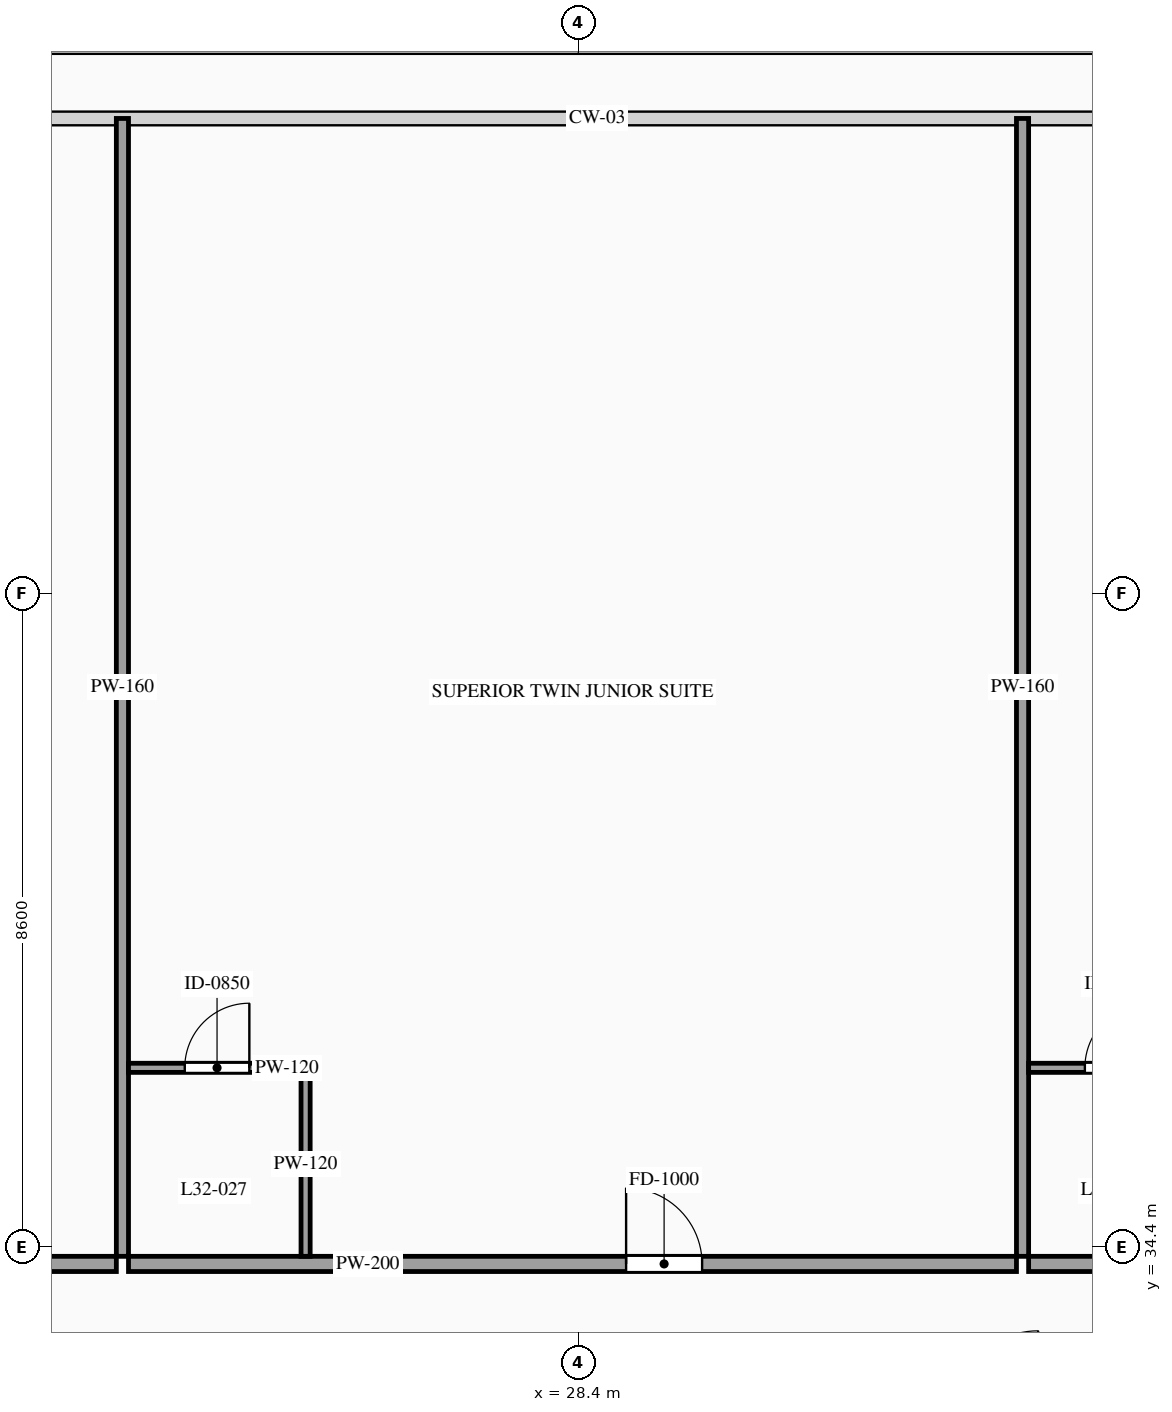
"""IFC4 building model, lengths in metres.
Left out: names, types, materials, properties, quantities, classifications, styles, units other than length and angle.
Written with IfcOpenShell. Run it as: python <this file> out.ifc"""

import sys

from ifc_helpers import new_model, si_unit, direction, frame, frame_2d, origin, place, context, subcontext, project, spatial, rectangle, extrude, source, transform, mapped, element, fill, save


model = new_model("IFC4")
c1 = context("Model", 3, precision=1e-05, world=origin(), true_north=direction((0.0, 1.0)))
c2 = subcontext(c1, "Body", "Model", "MODEL_VIEW")
j1 = project(units=[si_unit("LENGTHUNIT", "METRE"), si_unit("PLANEANGLEUNIT", "RADIAN")], contexts=[c1])
p1 = place(None, origin())
s1 = spatial("IfcSite", under=j1, at=p1, CompositionType="ELEMENT")
p2 = place(p1, origin())
s2 = spatial("IfcBuilding", under=s1, at=p2, CompositionType="ELEMENT")
p3 = place(p2, frame((0.0, 0.0, 122.6)))
s3 = spatial("IfcBuildingStorey", under=s2, at=p3, CompositionType="ELEMENT", Elevation=122.6)
p4 = place(p3, frame((16.44, 34.18, 0.0), z_axis=(0.0, 0.0, 1.0), x_axis=(1.0, 0.0, 0.0)))
e1 = element("IfcWall", 1, at=p4, inside=s3, PredefinedType="PARTITIONING", context=c2, shape_type="SweptSolid", body=[
    extrude(rectangle(XDim=5.882, YDim=0.2, at=frame_2d((2.941, 0.0))), origin(), (0.0, 0.0, 1.0), 3.38),
])
p5 = place(p4, frame((3.646, 0.0, 0.0)))
e2 = element("IfcOpeningElement", 2, at=p5, cuts=e1, PredefinedType="OPENING", context=c2, shape_type="SweptSolid", body=[
    extrude(rectangle(XDim=1.0, YDim=2.2, at=frame_2d((0.5, 1.1))), frame((0.0, 0.115, 0.0), z_axis=(0.0, -1.0, 0.0), x_axis=(1.0, 0.0, 0.0)), (0.0, 0.0, 1.0), 0.23),
])
m1 = source(origin(), c2, "Body", "SweptSolid", [
    extrude(rectangle(XDim=14.97, YDim=0.16, at=frame_2d((7.485, 0.0))), origin(), (0.0, 0.0, 1.0), 3.38),
])
p6 = place(p3, frame((22.402, 34.28, 0.0), z_axis=(0.0, 0.0, 1.0), x_axis=(0.0, 1.0, 0.0)))
e3 = element("IfcWall", 3, at=p6, inside=s3, PredefinedType="PARTITIONING", context=c2, shape_type="MappedRepresentation", body=[
    mapped(m1, transform((0.0, 0.0, 0.0), scale=1.0)),
])
p7 = place(p3, frame((22.482, 34.18, 0.0), z_axis=(0.0, 0.0, 1.0), x_axis=(1.0, 0.0, 0.0)))
e4 = element("IfcWall", 4, at=p7, inside=s3, PredefinedType="PARTITIONING", context=c2, shape_type="SweptSolid", body=[
    extrude(rectangle(XDim=11.683, YDim=0.2, at=frame_2d((5.842, 0.0))), origin(), (0.0, 0.0, 1.0), 3.38),
])
p8 = place(p7, frame((6.547, 0.0, 0.0)))
e5 = element("IfcOpeningElement", 5, at=p8, cuts=e4, PredefinedType="OPENING", context=c2, shape_type="SweptSolid", body=[
    extrude(rectangle(XDim=1.0, YDim=2.2, at=frame_2d((0.5, 1.1))), frame((0.0, 0.115, 0.0), z_axis=(0.0, -1.0, 0.0), x_axis=(1.0, 0.0, 0.0)), (0.0, 0.0, 1.0), 0.23),
])
p9 = place(p3, frame((34.245, 34.28, 0.0), z_axis=(0.0, 0.0, 1.0), x_axis=(0.0, 1.0, 0.0)))
e6 = element("IfcWall", 6, at=p9, inside=s3, PredefinedType="PARTITIONING", context=c2, shape_type="MappedRepresentation", body=[
    mapped(m1, transform((0.0, 0.0, 0.0), scale=1.0)),
])
p10 = place(p3, frame((22.482, 36.76, 0.0), z_axis=(0.0, 0.0, 1.0), x_axis=(1.0, 0.0, 0.0)))
e7 = element("IfcWall", 7, at=p10, inside=s3, PredefinedType="PARTITIONING", context=c2, shape_type="SweptSolid", body=[
    extrude(rectangle(XDim=2.33, YDim=0.12, at=frame_2d((1.165, 0.0))), origin(), (0.0, 0.0, 1.0), 3.38),
])
p11 = place(p10, frame((0.74, 0.0, 0.0)))
e8 = element("IfcOpeningElement", 8, at=p11, cuts=e7, PredefinedType="OPENING", context=c2, shape_type="SweptSolid", body=[
    extrude(rectangle(XDim=0.85, YDim=2.1, at=frame_2d((0.425, 1.05))), frame((0.0, 0.075, 0.0), z_axis=(0.0, -1.0, 0.0), x_axis=(1.0, 0.0, 0.0)), (0.0, 0.0, 1.0), 0.15),
])
m2 = source(origin(), c2, "Body", "SweptSolid", [
    extrude(rectangle(XDim=2.42, YDim=0.12, at=frame_2d((1.21, 0.0))), origin(), (0.0, 0.0, 1.0), 3.38),
])
p12 = place(p3, frame((24.812, 34.28, 0.0), z_axis=(0.0, 0.0, 1.0), x_axis=(0.0, 1.0, 0.0)))
e9 = element("IfcWall", 9, at=p12, inside=s3, PredefinedType="PARTITIONING", context=c2, shape_type="MappedRepresentation", body=[
    mapped(m2, transform((0.0, 0.0, 0.0), scale=1.0)),
])
p13 = place(p3, frame((34.325, 34.18, 0.0), z_axis=(0.0, 0.0, 1.0), x_axis=(1.0, 0.0, 0.0)))
e10 = element("IfcWall", 10, at=p13, inside=s3, PredefinedType="PARTITIONING", context=c2, shape_type="SweptSolid", body=[
    extrude(rectangle(XDim=4.445, YDim=0.2, at=frame_2d((2.223, 0.0))), origin(), (0.0, 0.0, 1.0), 3.38),
])
p14 = place(p13, frame((2.927, 0.0, 0.0)))
e11 = element("IfcOpeningElement", 11, at=p14, cuts=e10, PredefinedType="OPENING", context=c2, shape_type="SweptSolid", body=[
    extrude(rectangle(XDim=1.0, YDim=2.2, at=frame_2d((0.5, 1.1))), frame((0.0, 0.115, 0.0), z_axis=(0.0, -1.0, 0.0), x_axis=(1.0, 0.0, 0.0)), (0.0, 0.0, 1.0), 0.23),
])
p15 = place(p3, frame((34.325, 36.76, 0.0), z_axis=(0.0, 0.0, 1.0), x_axis=(1.0, 0.0, 0.0)))
e12 = element("IfcWall", 12, at=p15, inside=s3, PredefinedType="PARTITIONING", context=c2, shape_type="SweptSolid", body=[
    extrude(rectangle(XDim=2.33, YDim=0.12, at=frame_2d((1.165, 0.0))), origin(), (0.0, 0.0, 1.0), 3.38),
])
p16 = place(p15, frame((0.74, 0.0, 0.0)))
e13 = element("IfcOpeningElement", 13, at=p16, cuts=e12, PredefinedType="OPENING", context=c2, shape_type="SweptSolid", body=[
    extrude(rectangle(XDim=0.85, YDim=2.1, at=frame_2d((0.425, 1.05))), frame((0.0, 0.075, 0.0), z_axis=(0.0, -1.0, 0.0), x_axis=(1.0, 0.0, 0.0)), (0.0, 0.0, 1.0), 0.15),
])
m3 = source(origin(), c2, "Body", "SweptSolid", [
    extrude(rectangle(XDim=1.0, YDim=2.2, at=frame_2d((0.5, 1.1))), frame((0.0, 0.025, 0.0), z_axis=(0.0, -1.0, 0.0), x_axis=(1.0, 0.0, 0.0)), (0.0, 0.0, 1.0), 0.05),
])
p17 = place(p8, origin())
e14 = element("IfcDoor", 14, at=p17, inside=s3, OperationType="SINGLE_SWING_LEFT", PredefinedType="DOOR", context=c2, shape_type="MappedRepresentation", body=[
    mapped(m3, transform((0.0, 0.0, 0.0), scale=1.0)),
])
fill(e5, e14)
m4 = source(origin(), c2, "Body", "SweptSolid", [
    extrude(rectangle(XDim=0.85, YDim=2.1, at=frame_2d((0.425, 1.05))), frame((0.0, 0.025, 0.0), z_axis=(0.0, -1.0, 0.0), x_axis=(1.0, 0.0, 0.0)), (0.0, 0.0, 1.0), 0.05),
])
p18 = place(p11, origin())
e15 = element("IfcDoor", 15, at=p18, inside=s3, OperationType="SINGLE_SWING_RIGHT", PredefinedType="DOOR", context=c2, shape_type="MappedRepresentation", body=[
    mapped(m4, transform((0.0, 0.0, 0.0), scale=1.0)),
])
fill(e8, e15)
p19 = place(p16, origin())
e16 = element("IfcDoor", 16, at=p19, inside=s3, OperationType="SINGLE_SWING_RIGHT", PredefinedType="DOOR", context=c2, shape_type="MappedRepresentation", body=[
    mapped(m4, transform((0.0, 0.0, 0.0), scale=1.0)),
])
fill(e13, e16)
save(model, sys.argv[1])
